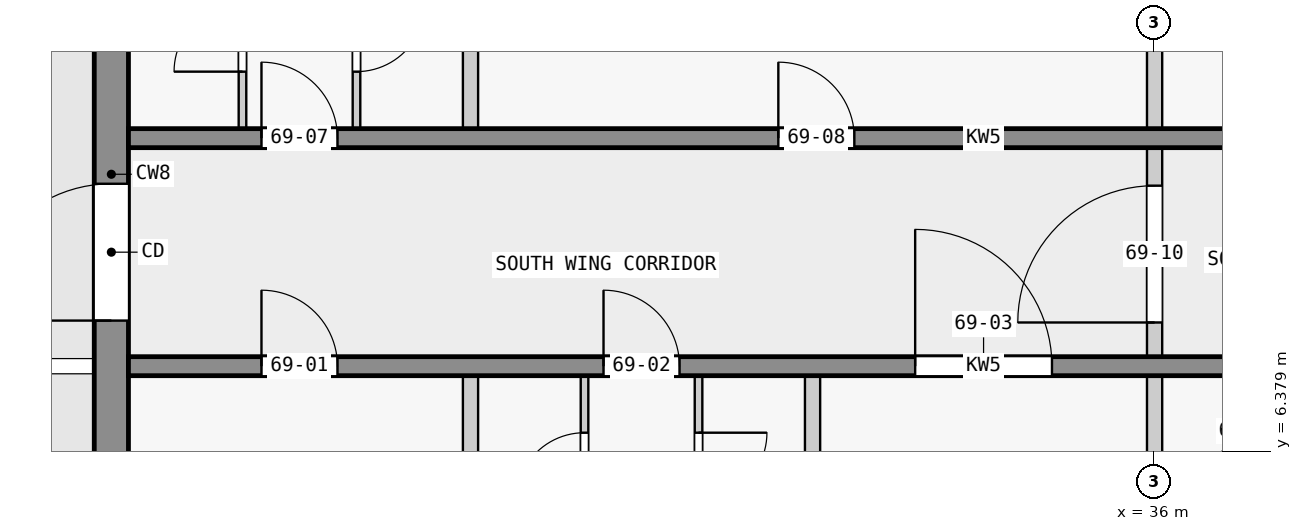
"""IFC4 building model, lengths in metres.
Left out: names, types, materials, properties, quantities, classifications, styles, units other than length and angle.
Written with IfcOpenShell. Run it as: python <this file> out.ifc"""

import sys

from ifc_helpers import new_model, si_unit, direction, frame, frame_2d, origin, place, context, subcontext, project, spatial, rectangle, extrude, element, fill, save


model = new_model("IFC4")
c1 = context("Model", 3, precision=1e-05, world=origin(), true_north=direction((0.0, 1.0)))
c2 = subcontext(c1, "Body", "Model", "MODEL_VIEW")
j1 = project(units=[si_unit("LENGTHUNIT", "METRE"), si_unit("PLANEANGLEUNIT", "RADIAN")], contexts=[c1])
p1 = place(None, origin())
s1 = spatial("IfcSite", under=j1, at=p1, CompositionType="ELEMENT")
p2 = place(p1, origin())
s2 = spatial("IfcBuilding", under=s1, at=p2, CompositionType="ELEMENT")
p3 = place(p2, frame((0.0, 0.0, 263.4)))
s3 = spatial("IfcBuildingStorey", under=s2, at=p3, CompositionType="ELEMENT", Elevation=263.4)
p4 = place(p3, frame((22.275, 2.5, 0.0), z_axis=(0.0, 0.0, 1.0), x_axis=(0.0, 1.0, 0.0)))
e1 = element("IfcWall", 1, at=p4, inside=s3, PredefinedType="SHEAR", context=c2, shape_type="SweptSolid", body=[
    extrude(rectangle(XDim=15.05, YDim=0.45, at=frame_2d((7.525, 0.0))), origin(), (0.0, 0.0, 1.0), 3.25),
])
p5 = place(p4, frame((5.6, 0.0, 0.0)))
e2 = element("IfcOpeningElement", 2, at=p5, cuts=e1, PredefinedType="OPENING", context=c2, shape_type="SweptSolid", body=[
    extrude(rectangle(XDim=1.8, YDim=2.1, at=frame_2d((0.9, 1.05))), frame((0.0, 0.235, 0.0), z_axis=(0.0, -1.0, 0.0), x_axis=(1.0, 0.0, 0.0)), (0.0, 0.0, 1.0), 0.47),
])
p6 = place(p3, frame((22.5, 7.5, 0.0), z_axis=(0.0, 0.0, 1.0), x_axis=(1.0, 0.0, 0.0)))
e3 = element("IfcWall", 3, at=p6, inside=s3, PredefinedType="SHEAR", context=c2, shape_type="SweptSolid", body=[
    extrude(rectangle(XDim=22.5, YDim=0.25, at=frame_2d((11.25, 0.0))), origin(), (0.0, 0.0, 1.0), 3.25),
])
p7 = place(p6, frame((1.75, 0.0, 0.0)))
e4 = element("IfcOpeningElement", 4, at=p7, cuts=e3, PredefinedType="OPENING", context=c2, shape_type="SweptSolid", body=[
    extrude(rectangle(XDim=1.0, YDim=2.1, at=frame_2d((0.5, 1.05))), frame((0.0, 0.135, 0.0), z_axis=(0.0, -1.0, 0.0), x_axis=(1.0, 0.0, 0.0)), (0.0, 0.0, 1.0), 0.27),
])
p8 = place(p6, frame((6.25, 0.0, 0.0)))
e5 = element("IfcOpeningElement", 5, at=p8, cuts=e3, PredefinedType="OPENING", context=c2, shape_type="SweptSolid", body=[
    extrude(rectangle(XDim=1.0, YDim=2.1, at=frame_2d((0.5, 1.05))), frame((0.0, 0.135, 0.0), z_axis=(0.0, -1.0, 0.0), x_axis=(1.0, 0.0, 0.0)), (0.0, 0.0, 1.0), 0.27),
])
p9 = place(p6, frame((10.35, 0.0, 0.0)))
e6 = element("IfcOpeningElement", 6, at=p9, cuts=e3, PredefinedType="OPENING", context=c2, shape_type="SweptSolid", body=[
    extrude(rectangle(XDim=1.8, YDim=2.1, at=frame_2d((0.9, 1.05))), frame((0.0, 0.135, 0.0), z_axis=(0.0, -1.0, 0.0), x_axis=(1.0, 0.0, 0.0)), (0.0, 0.0, 1.0), 0.27),
])
p10 = place(p6, frame((15.25, 0.0, 0.0)))
e7 = element("IfcOpeningElement", 7, at=p10, cuts=e3, PredefinedType="OPENING", context=c2, shape_type="SweptSolid", body=[
    extrude(rectangle(XDim=1.0, YDim=2.1, at=frame_2d((0.5, 1.05))), frame((0.0, 0.135, 0.0), z_axis=(0.0, -1.0, 0.0), x_axis=(1.0, 0.0, 0.0)), (0.0, 0.0, 1.0), 0.27),
])
p11 = place(p6, frame((18.75, 0.0, 0.0)))
e8 = element("IfcOpeningElement", 8, at=p11, cuts=e3, PredefinedType="OPENING", context=c2, shape_type="SweptSolid", body=[
    extrude(rectangle(XDim=0.9, YDim=2.1, at=frame_2d((0.45, 1.05))), frame((0.0, 0.135, 0.0), z_axis=(0.0, -1.0, 0.0), x_axis=(1.0, 0.0, 0.0)), (0.0, 0.0, 1.0), 0.27),
])
p12 = place(p6, frame((20.95, 0.0, 0.0)))
e9 = element("IfcOpeningElement", 9, at=p12, cuts=e3, PredefinedType="OPENING", context=c2, shape_type="SweptSolid", body=[
    extrude(rectangle(XDim=1.0, YDim=2.1, at=frame_2d((0.5, 1.05))), frame((0.0, 0.135, 0.0), z_axis=(0.0, -1.0, 0.0), x_axis=(1.0, 0.0, 0.0)), (0.0, 0.0, 1.0), 0.27),
])
p13 = place(p3, frame((22.5, 10.5, 0.0), z_axis=(0.0, 0.0, 1.0), x_axis=(1.0, 0.0, 0.0)))
e10 = element("IfcWall", 10, at=p13, inside=s3, PredefinedType="SHEAR", context=c2, shape_type="SweptSolid", body=[
    extrude(rectangle(XDim=22.5, YDim=0.25, at=frame_2d((11.25, 0.0))), origin(), (0.0, 0.0, 1.0), 3.25),
])
p14 = place(p13, frame((1.75, 0.0, 0.0)))
e11 = element("IfcOpeningElement", 11, at=p14, cuts=e10, PredefinedType="OPENING", context=c2, shape_type="SweptSolid", body=[
    extrude(rectangle(XDim=1.0, YDim=2.1, at=frame_2d((0.5, 1.05))), frame((0.0, 0.135, 0.0), z_axis=(0.0, -1.0, 0.0), x_axis=(1.0, 0.0, 0.0)), (0.0, 0.0, 1.0), 0.27),
])
p15 = place(p13, frame((8.55, 0.0, 0.0)))
e12 = element("IfcOpeningElement", 12, at=p15, cuts=e10, PredefinedType="OPENING", context=c2, shape_type="SweptSolid", body=[
    extrude(rectangle(XDim=1.0, YDim=2.1, at=frame_2d((0.5, 1.05))), frame((0.0, 0.135, 0.0), z_axis=(0.0, -1.0, 0.0), x_axis=(1.0, 0.0, 0.0)), (0.0, 0.0, 1.0), 0.27),
])
p16 = place(p13, frame((16.85, 0.0, 0.0)))
e13 = element("IfcOpeningElement", 13, at=p16, cuts=e10, PredefinedType="OPENING", context=c2, shape_type="SweptSolid", body=[
    extrude(rectangle(XDim=1.0, YDim=2.1, at=frame_2d((0.5, 1.05))), frame((0.0, 0.135, 0.0), z_axis=(0.0, -1.0, 0.0), x_axis=(1.0, 0.0, 0.0)), (0.0, 0.0, 1.0), 0.27),
])
p17 = place(p3, frame((24.0, 10.625, 0.0), z_axis=(0.0, 0.0, 1.0), x_axis=(0.0, 1.0, 0.0)))
e14 = element("IfcWall", 14, at=p17, inside=s3, PredefinedType="PARTITIONING", context=c2, shape_type="SweptSolid", body=[
    extrude(rectangle(XDim=2.4, YDim=0.1, at=frame_2d((1.2, 0.0))), origin(), (0.0, 0.0, 1.0), 3.25),
])
p18 = place(p17, frame((0.75, 0.0, 0.0)))
e15 = element("IfcOpeningElement", 15, at=p18, cuts=e14, PredefinedType="OPENING", context=c2, shape_type="SweptSolid", body=[
    extrude(rectangle(XDim=0.9, YDim=2.1, at=frame_2d((0.45, 1.05))), frame((0.0, 0.06, 0.0), z_axis=(0.0, -1.0, 0.0), x_axis=(1.0, 0.0, 0.0)), (0.0, 0.0, 1.0), 0.12),
])
p19 = place(p3, frame((25.5, 13.025, 0.0), z_axis=(0.0, 0.0, 1.0), x_axis=(0.0, -1.0, 0.0)))
e16 = element("IfcWall", 16, at=p19, inside=s3, PredefinedType="PARTITIONING", context=c2, shape_type="SweptSolid", body=[
    extrude(rectangle(XDim=2.4, YDim=0.1, at=frame_2d((1.2, 0.0))), origin(), (0.0, 0.0, 1.0), 3.25),
])
p20 = place(p19, frame((0.75, 0.0, 0.0)))
e17 = element("IfcOpeningElement", 17, at=p20, cuts=e16, PredefinedType="OPENING", context=c2, shape_type="SweptSolid", body=[
    extrude(rectangle(XDim=0.9, YDim=2.1, at=frame_2d((0.45, 1.05))), frame((0.0, 0.06, 0.0), z_axis=(0.0, -1.0, 0.0), x_axis=(1.0, 0.0, 0.0)), (0.0, 0.0, 1.0), 0.12),
])
p21 = place(p3, frame((27.0, 1.527, 0.0), z_axis=(0.0, 0.0, 1.0), x_axis=(0.0, 1.0, 0.0)))
e18 = element("IfcWall", 18, at=p21, inside=s3, PredefinedType="PARTITIONING", context=c2, shape_type="SweptSolid", body=[
    extrude(rectangle(XDim=5.848, YDim=0.2, at=frame_2d((2.924, 0.0))), origin(), (0.0, 0.0, 1.0), 3.25),
])
p22 = place(p3, frame((27.0, 10.625, 0.0), z_axis=(0.0, 0.0, 1.0), x_axis=(0.0, 1.0, 0.0)))
e19 = element("IfcWall", 19, at=p22, inside=s3, PredefinedType="PARTITIONING", context=c2, shape_type="SweptSolid", body=[
    extrude(rectangle(XDim=2.3, YDim=0.2, at=frame_2d((1.15, 0.0))), origin(), (0.0, 0.0, 1.0), 3.25),
])
p23 = place(p3, frame((28.5, 4.975, 0.0), z_axis=(0.0, 0.0, 1.0), x_axis=(0.0, 1.0, 0.0)))
e20 = element("IfcWall", 20, at=p23, inside=s3, PredefinedType="PARTITIONING", context=c2, shape_type="SweptSolid", body=[
    extrude(rectangle(XDim=2.4, YDim=0.1, at=frame_2d((1.2, 0.0))), origin(), (0.0, 0.0, 1.0), 3.25),
])
p24 = place(p23, frame((0.75, 0.0, 0.0)))
e21 = element("IfcOpeningElement", 21, at=p24, cuts=e20, PredefinedType="OPENING", context=c2, shape_type="SweptSolid", body=[
    extrude(rectangle(XDim=0.9, YDim=2.1, at=frame_2d((0.45, 1.05))), frame((0.0, 0.06, 0.0), z_axis=(0.0, -1.0, 0.0), x_axis=(1.0, 0.0, 0.0)), (0.0, 0.0, 1.0), 0.12),
])
p25 = place(p3, frame((30.0, 7.375, 0.0), z_axis=(0.0, 0.0, 1.0), x_axis=(0.0, -1.0, 0.0)))
e22 = element("IfcWall", 22, at=p25, inside=s3, PredefinedType="PARTITIONING", context=c2, shape_type="SweptSolid", body=[
    extrude(rectangle(XDim=2.4, YDim=0.1, at=frame_2d((1.2, 0.0))), origin(), (0.0, 0.0, 1.0), 3.25),
])
p26 = place(p25, frame((0.75, 0.0, 0.0)))
e23 = element("IfcOpeningElement", 23, at=p26, cuts=e22, PredefinedType="OPENING", context=c2, shape_type="SweptSolid", body=[
    extrude(rectangle(XDim=0.9, YDim=2.1, at=frame_2d((0.45, 1.05))), frame((0.0, 0.06, 0.0), z_axis=(0.0, -1.0, 0.0), x_axis=(1.0, 0.0, 0.0)), (0.0, 0.0, 1.0), 0.12),
])
p27 = place(p3, frame((31.5, 5.075, 0.0), z_axis=(0.0, 0.0, 1.0), x_axis=(0.0, 1.0, 0.0)))
e24 = element("IfcWall", 24, at=p27, inside=s3, PredefinedType="PARTITIONING", context=c2, shape_type="SweptSolid", body=[
    extrude(rectangle(XDim=2.3, YDim=0.2, at=frame_2d((1.15, 0.0))), origin(), (0.0, 0.0, 1.0), 3.25),
])
for number, where, z_axis, x_axis in (
    (25, (36.0, 1.4, 0.0), (0.0, 0.0, 1.0), (0.0, 1.0, 0.0)),
    (26, (36.0, 10.625, 0.0), (0.0, 0.0, 1.0), (0.0, 1.0, 0.0)),
):
    element("IfcWall", number, at=place(p3, frame(where, z_axis=z_axis, x_axis=x_axis)), inside=s3, PredefinedType="PARTITIONING", context=c2, shape_type="SweptSolid", body=[
        extrude(rectangle(XDim=5.975, YDim=0.2, at=frame_2d((2.988, 0.0))), origin(), (0.0, 0.0, 1.0), 3.25),
    ])
p28 = place(p3, frame((36.0, 7.475, 0.0), z_axis=(0.0, 0.0, 1.0), x_axis=(0.0, 1.0, 0.0)))
e27 = element("IfcWall", 27, at=p28, inside=s3, PredefinedType="PARTITIONING", context=c2, shape_type="SweptSolid", body=[
    extrude(rectangle(XDim=3.05, YDim=0.2, at=frame_2d((1.525, 0.0))), origin(), (0.0, 0.0, 1.0), 3.25),
])
p29 = place(p28, frame((0.6, 0.0, 0.0)))
e28 = element("IfcOpeningElement", 28, at=p29, cuts=e27, PredefinedType="OPENING", context=c2, shape_type="SweptSolid", body=[
    extrude(rectangle(XDim=1.8, YDim=2.1, at=frame_2d((0.9, 1.05))), frame((0.0, 0.11, 0.0), z_axis=(0.0, -1.0, 0.0), x_axis=(1.0, 0.0, 0.0)), (0.0, 0.0, 1.0), 0.22),
])
p30 = place(p5, origin())
e29 = element("IfcDoor", 29, at=p30, inside=s3, OperationType="DOUBLE_DOOR_SINGLE_SWING", PredefinedType="DOOR", context=c2, shape_type="SweptSolid", body=[
    extrude(rectangle(XDim=1.8, YDim=2.1, at=frame_2d((0.9, 1.05))), frame((0.0, 0.025, 0.0), z_axis=(0.0, -1.0, 0.0), x_axis=(1.0, 0.0, 0.0)), (0.0, 0.0, 1.0), 0.05),
])
fill(e2, e29)
p31 = place(p7, origin())
e30 = element("IfcDoor", 30, at=p31, inside=s3, OperationType="SINGLE_SWING_LEFT", PredefinedType="DOOR", context=c2, shape_type="SweptSolid", body=[
    extrude(rectangle(XDim=1.0, YDim=2.1, at=frame_2d((0.5, 1.05))), frame((0.0, 0.025, 0.0), z_axis=(0.0, -1.0, 0.0), x_axis=(1.0, 0.0, 0.0)), (0.0, 0.0, 1.0), 0.05),
])
fill(e4, e30)
p32 = place(p8, origin())
e31 = element("IfcDoor", 31, at=p32, inside=s3, OperationType="SINGLE_SWING_LEFT", PredefinedType="DOOR", context=c2, shape_type="SweptSolid", body=[
    extrude(rectangle(XDim=1.0, YDim=2.1, at=frame_2d((0.5, 1.05))), frame((0.0, 0.025, 0.0), z_axis=(0.0, -1.0, 0.0), x_axis=(1.0, 0.0, 0.0)), (0.0, 0.0, 1.0), 0.05),
])
fill(e5, e31)
p33 = place(p9, origin())
e32 = element("IfcDoor", 32, at=p33, inside=s3, OperationType="SINGLE_SWING_LEFT", PredefinedType="DOOR", context=c2, shape_type="SweptSolid", body=[
    extrude(rectangle(XDim=1.8, YDim=2.1, at=frame_2d((0.9, 1.05))), frame((0.0, 0.025, 0.0), z_axis=(0.0, -1.0, 0.0), x_axis=(1.0, 0.0, 0.0)), (0.0, 0.0, 1.0), 0.05),
])
fill(e6, e32)
p34 = place(p14, origin())
e33 = element("IfcDoor", 33, at=p34, inside=s3, OperationType="SINGLE_SWING_LEFT", PredefinedType="DOOR", context=c2, shape_type="SweptSolid", body=[
    extrude(rectangle(XDim=1.0, YDim=2.1, at=frame_2d((0.5, 1.05))), frame((0.0, 0.025, 0.0), z_axis=(0.0, -1.0, 0.0), x_axis=(1.0, 0.0, 0.0)), (0.0, 0.0, 1.0), 0.05),
])
fill(e11, e33)
p35 = place(p15, origin())
e34 = element("IfcDoor", 34, at=p35, inside=s3, OperationType="SINGLE_SWING_LEFT", PredefinedType="DOOR", context=c2, shape_type="SweptSolid", body=[
    extrude(rectangle(XDim=1.0, YDim=2.1, at=frame_2d((0.5, 1.05))), frame((0.0, 0.025, 0.0), z_axis=(0.0, -1.0, 0.0), x_axis=(1.0, 0.0, 0.0)), (0.0, 0.0, 1.0), 0.05),
])
fill(e12, e34)
p36 = place(p29, origin())
e35 = element("IfcDoor", 35, at=p36, inside=s3, OperationType="SINGLE_SWING_LEFT", PredefinedType="DOOR", context=c2, shape_type="SweptSolid", body=[
    extrude(rectangle(XDim=1.8, YDim=2.1, at=frame_2d((0.9, 1.05))), frame((0.0, 0.025, 0.0), z_axis=(0.0, -1.0, 0.0), x_axis=(1.0, 0.0, 0.0)), (0.0, 0.0, 1.0), 0.05),
])
fill(e28, e35)
p37 = place(p24, origin())
e36 = element("IfcDoor", 36, at=p37, inside=s3, OperationType="SINGLE_SWING_LEFT", PredefinedType="DOOR", context=c2, shape_type="SweptSolid", body=[
    extrude(rectangle(XDim=0.9, YDim=2.1, at=frame_2d((0.45, 1.05))), frame((0.0, 0.025, 0.0), z_axis=(0.0, -1.0, 0.0), x_axis=(1.0, 0.0, 0.0)), (0.0, 0.0, 1.0), 0.05),
])
fill(e21, e36)
p38 = place(p26, origin())
e37 = element("IfcDoor", 37, at=p38, inside=s3, OperationType="SINGLE_SWING_LEFT", PredefinedType="DOOR", context=c2, shape_type="SweptSolid", body=[
    extrude(rectangle(XDim=0.9, YDim=2.1, at=frame_2d((0.45, 1.05))), frame((0.0, 0.025, 0.0), z_axis=(0.0, -1.0, 0.0), x_axis=(1.0, 0.0, 0.0)), (0.0, 0.0, 1.0), 0.05),
])
fill(e23, e37)
p39 = place(p18, origin())
e38 = element("IfcDoor", 38, at=p39, inside=s3, OperationType="SINGLE_SWING_LEFT", PredefinedType="DOOR", context=c2, shape_type="SweptSolid", body=[
    extrude(rectangle(XDim=0.9, YDim=2.1, at=frame_2d((0.45, 1.05))), frame((0.0, 0.025, 0.0), z_axis=(0.0, -1.0, 0.0), x_axis=(1.0, 0.0, 0.0)), (0.0, 0.0, 1.0), 0.05),
])
fill(e15, e38)
p40 = place(p20, origin())
e39 = element("IfcDoor", 39, at=p40, inside=s3, OperationType="SINGLE_SWING_LEFT", PredefinedType="DOOR", context=c2, shape_type="SweptSolid", body=[
    extrude(rectangle(XDim=0.9, YDim=2.1, at=frame_2d((0.45, 1.05))), frame((0.0, 0.025, 0.0), z_axis=(0.0, -1.0, 0.0), x_axis=(1.0, 0.0, 0.0)), (0.0, 0.0, 1.0), 0.05),
])
fill(e17, e39)
save(model, sys.argv[1])
